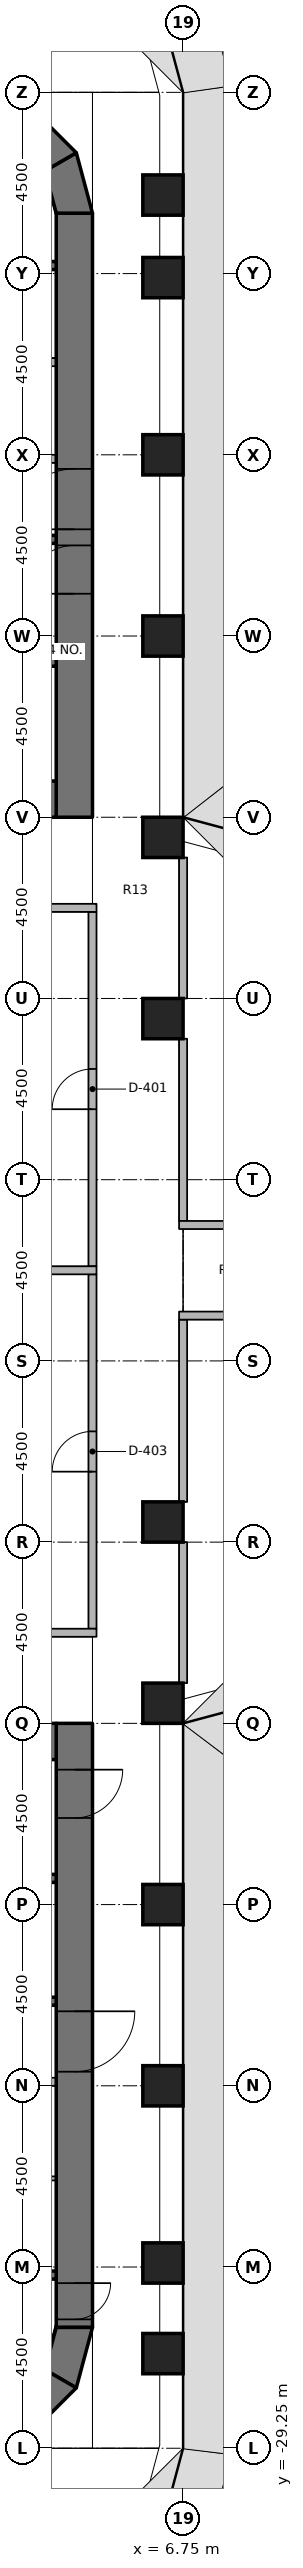
"""IFC4 building model, lengths in metres.
Left out: names, types, materials, properties, quantities, classifications, styles, units other than length and angle.
Written with IfcOpenShell. Run it as: python <this file> out.ifc"""

import sys

from ifc_helpers import new_model, si_unit, direction, frame, frame_2d, origin, origin_2d, place, context, subcontext, project, spatial, polyline, rectangle, outline, extrude, element, fill, save


model = new_model("IFC4")
c1 = context("Model", 3, precision=1e-05, world=origin(), true_north=direction((0.0, 1.0)))
c2 = subcontext(c1, "Body", "Model", "MODEL_VIEW")
j1 = project(units=[si_unit("LENGTHUNIT", "METRE"), si_unit("PLANEANGLEUNIT", "RADIAN")], contexts=[c1])
p1 = place(None, origin())
s1 = spatial("IfcSite", under=j1, at=p1, CompositionType="ELEMENT")
p2 = place(p1, origin())
s2 = spatial("IfcBuilding", under=s1, at=p2, CompositionType="ELEMENT")
p3 = place(p2, frame((0.0, 0.0, 56.4)))
s3 = spatial("IfcBuildingStorey", under=s2, at=p3, CompositionType="ELEMENT", Elevation=56.4)
for number, where, z_axis, x_axis in (
    (1, (6.25, -26.9, 0.0), (0.0, 0.0, 1.0), (1.0, 0.0, 0.0)),
    (2, (6.25, -24.65, 0.0), (0.0, 0.0, 1.0), (1.0, 0.0, 0.0)),
    (3, (6.25, -20.25, 0.0), (0.0, 0.0, 1.0), (1.0, 0.0, 0.0)),
    (4, (6.25, -15.75, 0.0), (0.0, 0.0, 1.0), (1.0, 0.0, 0.0)),
    (5, (6.25, -10.75, 0.0), (0.0, 0.0, 1.0), (1.0, 0.0, 0.0)),
    (6, (6.25, -6.25, 0.0), (0.0, 0.0, 1.0), (1.0, 0.0, 0.0)),
    (7, (6.25, 6.25, 0.0), (0.0, 0.0, 1.0), (1.0, 0.0, 0.0)),
    (8, (6.25, 10.75, 0.0), (0.0, 0.0, 1.0), (1.0, 0.0, 0.0)),
    (9, (6.25, 15.75, 0.0), (0.0, 0.0, 1.0), (1.0, 0.0, 0.0)),
    (10, (6.25, 20.25, 0.0), (0.0, 0.0, 1.0), (1.0, 0.0, 0.0)),
    (11, (6.25, 24.65, 0.0), (0.0, 0.0, 1.0), (1.0, 0.0, 0.0)),
    (12, (6.25, 26.7, 0.0), (0.0, 0.0, 1.0), (1.0, 0.0, 0.0)),
):
    element("IfcColumn", number, at=place(p3, frame(where, z_axis=z_axis, x_axis=x_axis)), inside=s3, PredefinedType="COLUMN", context=c2, shape_type="SweptSolid", body=[
        extrude(rectangle(XDim=1.0, YDim=1.0, at=origin_2d()), origin(), (0.0, 0.0, 1.0), 4.05),
    ])
p4 = place(p3, frame((4.05, 11.25, 0.0), z_axis=(0.0, 0.0, 1.0), x_axis=(0.0, 1.0, 0.0)))
e13 = element("IfcWall", 13, at=p4, inside=s3, PredefinedType="SHEAR", context=c2, shape_type="SweptSolid", body=[
    extrude(rectangle(XDim=15.0, YDim=0.9, at=frame_2d((7.5, 0.0))), origin(), (0.0, 0.0, 1.0), 4.2),
])
p5 = place(p4, frame((7.15, 0.0, 0.0)))
e14 = element("IfcOpeningElement", 14, at=p5, cuts=e13, PredefinedType="OPENING", context=c2, shape_type="SweptSolid", body=[
    extrude(rectangle(XDim=1.5, YDim=2.3, at=frame_2d((0.75, 1.15))), frame((0.0, 0.46, 0.0), z_axis=(0.0, -1.0, 0.0), x_axis=(1.0, 0.0, 0.0)), (0.0, 0.0, 1.0), 0.92),
])
p6 = place(p4, frame((5.55, 0.0, 0.0)))
e15 = element("IfcOpeningElement", 15, at=p6, cuts=e13, PredefinedType="OPENING", context=c2, shape_type="SweptSolid", body=[
    extrude(rectangle(XDim=1.2, YDim=2.1, at=frame_2d((0.6, 1.05))), frame((0.0, 0.46, 0.0), z_axis=(0.0, -1.0, 0.0), x_axis=(1.0, 0.0, 0.0)), (0.0, 0.0, 1.0), 0.92),
])
p7 = place(p3, frame((-3.6, 11.7, 0.0), z_axis=(0.0, 0.0, 1.0), x_axis=(1.0, 0.0, 0.0)))
e16 = element("IfcWall", 16, at=p7, inside=s3, PredefinedType="SHEAR", context=c2, shape_type="SweptSolid", body=[
    extrude(rectangle(XDim=7.2, YDim=0.9, at=frame_2d((3.6, 0.0))), origin(), (0.0, 0.0, 1.0), 4.2),
])
p8 = place(p3, origin())
e17 = element("IfcWall", 17, at=p8, inside=s3, PredefinedType="SHEAR", context=c2, shape_type="SweptSolid", body=[
    extrude(outline(polyline([(4.5, 26.25), (4.098, 27.75), (3.319, 27.3), (3.6, 26.25), (4.5, 26.25)])), origin(), (0.0, 0.0, 1.0), 4.2),
])
p9 = place(p3, origin())
e18 = element("IfcWall", 18, at=p9, inside=s3, PredefinedType="SHEAR", context=c2, shape_type="SweptSolid", body=[
    extrude(outline(polyline([(4.098, 27.75), (3.0, 28.848), (2.55, 28.069), (3.319, 27.3), (4.098, 27.75)])), origin(), (0.0, 0.0, 1.0), 4.2),
])
p10 = place(p3, frame((4.05, -11.25, 0.0), z_axis=(0.0, 0.0, 1.0), x_axis=(0.0, -1.0, 0.0)))
e19 = element("IfcWall", 19, at=p10, inside=s3, PredefinedType="SHEAR", context=c2, shape_type="SweptSolid", body=[
    extrude(rectangle(XDim=15.0, YDim=0.9, at=frame_2d((7.5, 0.0))), origin(), (0.0, 0.0, 1.0), 4.2),
])
p11 = place(p10, frame((7.15, 0.0, 0.0)))
e20 = element("IfcOpeningElement", 20, at=p11, cuts=e19, PredefinedType="OPENING", context=c2, shape_type="SweptSolid", body=[
    extrude(rectangle(XDim=1.5, YDim=2.3, at=frame_2d((0.75, 1.15))), frame((0.0, 0.46, 0.0), z_axis=(0.0, -1.0, 0.0), x_axis=(1.0, 0.0, 0.0)), (0.0, 0.0, 1.0), 0.92),
])
p12 = place(p10, frame((13.9, 0.0, 0.0)))
e21 = element("IfcOpeningElement", 21, at=p12, cuts=e19, PredefinedType="OPENING", context=c2, shape_type="SweptSolid", body=[
    extrude(rectangle(XDim=0.9, YDim=2.1, at=frame_2d((0.45, 1.05))), frame((0.0, 0.46, 0.0), z_axis=(0.0, -1.0, 0.0), x_axis=(1.0, 0.0, 0.0)), (0.0, 0.0, 1.0), 0.92),
])
p13 = place(p10, frame((1.15, 0.0, 0.0)))
e22 = element("IfcOpeningElement", 22, at=p13, cuts=e19, PredefinedType="OPENING", context=c2, shape_type="SweptSolid", body=[
    extrude(rectangle(XDim=1.2, YDim=2.1, at=frame_2d((0.6, 1.05))), frame((0.0, 0.46, 0.0), z_axis=(0.0, -1.0, 0.0), x_axis=(1.0, 0.0, 0.0)), (0.0, 0.0, 1.0), 0.92),
])
p14 = place(p3, frame((-3.6, -11.7, 0.0), z_axis=(0.0, 0.0, 1.0), x_axis=(1.0, 0.0, 0.0)))
e23 = element("IfcWall", 23, at=p14, inside=s3, PredefinedType="SHEAR", context=c2, shape_type="SweptSolid", body=[
    extrude(rectangle(XDim=7.2, YDim=0.9, at=frame_2d((3.6, 0.0))), origin(), (0.0, 0.0, 1.0), 4.2),
])
p15 = place(p3, origin())
e24 = element("IfcWall", 24, at=p15, inside=s3, PredefinedType="SHEAR", context=c2, shape_type="SweptSolid", body=[
    extrude(outline(polyline([(4.5, -26.25), (4.098, -27.75), (3.319, -27.3), (3.6, -26.25), (4.5, -26.25)])), origin(), (0.0, 0.0, 1.0), 4.2),
])
p16 = place(p3, origin())
e25 = element("IfcWall", 25, at=p16, inside=s3, PredefinedType="SHEAR", context=c2, shape_type="SweptSolid", body=[
    extrude(outline(polyline([(4.098, -27.75), (3.0, -28.848), (2.55, -28.069), (3.319, -27.3), (4.098, -27.75)])), origin(), (0.0, 0.0, 1.0), 4.2),
])
for number, where, z_axis, x_axis in (
    (26, (-3.6, 24.95, 0.0), (0.0, 0.0, 1.0), (1.0, 0.0, 0.0)),
    (27, (-3.6, 18.15, 0.0), (0.0, 0.0, 1.0), (1.0, 0.0, 0.0)),
    (28, (-3.6, 15.1, 0.0), (0.0, 0.0, 1.0), (1.0, 0.0, 0.0)),
):
    element("IfcWall", number, at=place(p3, frame(where, z_axis=z_axis, x_axis=x_axis)), inside=s3, PredefinedType="SHEAR", context=c2, shape_type="SweptSolid", body=[
        extrude(rectangle(XDim=7.2, YDim=0.2, at=frame_2d((3.6, 0.0))), origin(), (0.0, 0.0, 1.0), 4.05),
    ])
p17 = place(p3, frame((0.9, 20.15, 0.0), z_axis=(0.0, 0.0, 1.0), x_axis=(1.0, 0.0, 0.0)))
e29 = element("IfcWall", 29, at=p17, inside=s3, PredefinedType="PARTITIONING", context=c2, shape_type="SweptSolid", body=[
    extrude(rectangle(XDim=2.7, YDim=0.2, at=frame_2d((1.35, 0.0))), origin(), (0.0, 0.0, 1.0), 4.05),
])
p18 = place(p3, frame((1.1, 22.55, 0.0), z_axis=(0.0, 0.0, 1.0), x_axis=(1.0, 0.0, 0.0)))
e30 = element("IfcWall", 30, at=p18, inside=s3, PredefinedType="PARTITIONING", context=c2, shape_type="SweptSolid", body=[
    extrude(rectangle(XDim=2.5, YDim=0.2, at=frame_2d((1.25, 0.0))), origin(), (0.0, 0.0, 1.0), 4.05),
])
for number, where, z_axis, x_axis in (
    (31, (3.6, -24.95, 0.0), (0.0, 0.0, 1.0), (-1.0, 0.0, 0.0)),
    (32, (3.6, -18.15, 0.0), (0.0, 0.0, 1.0), (-1.0, 0.0, 0.0)),
    (33, (3.6, -15.1, 0.0), (0.0, 0.0, 1.0), (-1.0, 0.0, 0.0)),
):
    element("IfcWall", number, at=place(p3, frame(where, z_axis=z_axis, x_axis=x_axis)), inside=s3, PredefinedType="SHEAR", context=c2, shape_type="SweptSolid", body=[
        extrude(rectangle(XDim=7.2, YDim=0.2, at=frame_2d((3.6, 0.0))), origin(), (0.0, 0.0, 1.0), 4.05),
    ])
p19 = place(p3, frame((3.6, -20.15, 0.0), z_axis=(0.0, 0.0, 1.0), x_axis=(-1.0, 0.0, 0.0)))
e34 = element("IfcWall", 34, at=p19, inside=s3, PredefinedType="PARTITIONING", context=c2, shape_type="SweptSolid", body=[
    extrude(rectangle(XDim=2.7, YDim=0.2, at=frame_2d((1.35, 0.0))), origin(), (0.0, 0.0, 1.0), 4.05),
])
p20 = place(p3, frame((3.6, -22.55, 0.0), z_axis=(0.0, 0.0, 1.0), x_axis=(-1.0, 0.0, 0.0)))
e35 = element("IfcWall", 35, at=p20, inside=s3, PredefinedType="PARTITIONING", context=c2, shape_type="SweptSolid", body=[
    extrude(rectangle(XDim=2.5, YDim=0.1, at=frame_2d((1.25, 0.0))), origin(), (0.0, 0.0, 1.0), 4.05),
])
p21 = place(p3, frame((4.5, 0.1, 0.0), z_axis=(0.0, 0.0, 1.0), x_axis=(0.0, 1.0, 0.0)))
e36 = element("IfcWall", 36, at=p21, inside=s3, PredefinedType="PARTITIONING", context=c2, shape_type="SweptSolid", body=[
    extrude(rectangle(XDim=8.8, YDim=0.2, at=frame_2d((4.4, 0.0))), origin(), (0.0, 0.0, 1.0), 3.131),
])
p22 = place(p21, frame((3.9, 0.0, 0.0)))
e37 = element("IfcOpeningElement", 37, at=p22, cuts=e36, PredefinedType="OPENING", context=c2, shape_type="SweptSolid", body=[
    extrude(rectangle(XDim=1.0, YDim=2.1, at=frame_2d((0.5, 1.05))), frame((0.0, 0.11, 0.0), z_axis=(0.0, -1.0, 0.0), x_axis=(1.0, 0.0, 0.0)), (0.0, 0.0, 1.0), 0.22),
])
p23 = place(p3, frame((4.5, -8.9, 0.0), z_axis=(0.0, 0.0, 1.0), x_axis=(0.0, 1.0, 0.0)))
e38 = element("IfcWall", 38, at=p23, inside=s3, PredefinedType="PARTITIONING", context=c2, shape_type="SweptSolid", body=[
    extrude(rectangle(XDim=8.8, YDim=0.2, at=frame_2d((4.4, 0.0))), origin(), (0.0, 0.0, 1.0), 3.131),
])
p24 = place(p23, frame((3.9, 0.0, 0.0)))
e39 = element("IfcOpeningElement", 39, at=p24, cuts=e38, PredefinedType="OPENING", context=c2, shape_type="SweptSolid", body=[
    extrude(rectangle(XDim=1.0, YDim=2.1, at=frame_2d((0.5, 1.05))), frame((0.0, 0.11, 0.0), z_axis=(0.0, -1.0, 0.0), x_axis=(1.0, 0.0, 0.0)), (0.0, 0.0, 1.0), 0.22),
])
p25 = place(p3, frame((6.75, 1.225, 0.0), z_axis=(0.0, 0.0, 1.0), x_axis=(0.0, 1.0, 0.0)))
e40 = element("IfcWall", 40, at=p25, inside=s3, PredefinedType="PARTITIONING", context=c2, shape_type="SweptSolid", body=[
    extrude(rectangle(XDim=4.525, YDim=0.2, at=frame_2d((2.262, 0.0))), origin(), (0.0, 0.0, 1.0), 3.131),
])
for number, where, z_axis, x_axis in (
    (41, (6.75, 6.75, 0.0), (0.0, 0.0, 1.0), (0.0, 1.0, 0.0)),
    (42, (6.75, -10.25, 0.0), (0.0, 0.0, 1.0), (0.0, 1.0, 0.0)),
):
    element("IfcWall", number, at=place(p3, frame(where, z_axis=z_axis, x_axis=x_axis)), inside=s3, PredefinedType="PARTITIONING", context=c2, shape_type="SweptSolid", body=[
        extrude(rectangle(XDim=3.5, YDim=0.2, at=frame_2d((1.75, 0.0))), origin(), (0.0, 0.0, 1.0), 3.131),
    ])
p26 = place(p3, frame((6.75, -5.75, 0.0), z_axis=(0.0, 0.0, 1.0), x_axis=(0.0, 1.0, 0.0)))
e43 = element("IfcWall", 43, at=p26, inside=s3, PredefinedType="PARTITIONING", context=c2, shape_type="SweptSolid", body=[
    extrude(rectangle(XDim=4.525, YDim=0.2, at=frame_2d((2.262, 0.0))), origin(), (0.0, 0.0, 1.0), 3.131),
])
for number, where, z_axis, x_axis in (
    (44, (-0.1, 9.0, 0.0), (0.0, 0.0, 1.0), (1.0, 0.0, 0.0)),
    (45, (-0.1, -9.0, 0.0), (0.0, 0.0, 1.0), (1.0, 0.0, 0.0)),
    (46, (-0.1, 0.0, 0.0), (0.0, 0.0, 1.0), (1.0, 0.0, 0.0)),
):
    element("IfcWall", number, at=place(p3, frame(where, z_axis=z_axis, x_axis=x_axis)), inside=s3, PredefinedType="PARTITIONING", context=c2, shape_type="SweptSolid", body=[
        extrude(rectangle(XDim=4.7, YDim=0.2, at=frame_2d((2.35, 0.0))), origin(), (0.0, 0.0, 1.0), 3.131),
    ])
p27 = place(p3, frame((6.65, 1.125, 0.0), z_axis=(0.0, 0.0, 1.0), x_axis=(1.0, 0.0, 0.0)))
e47 = element("IfcWall", 47, at=p27, inside=s3, PredefinedType="PARTITIONING", context=c2, shape_type="SweptSolid", body=[
    extrude(rectangle(XDim=4.7, YDim=0.2, at=frame_2d((2.35, 0.0))), origin(), (0.0, 0.0, 1.0), 3.131),
])
p28 = place(p27, frame((1.85, 0.0, 0.0)))
e48 = element("IfcOpeningElement", 48, at=p28, cuts=e47, PredefinedType="OPENING", context=c2, shape_type="SweptSolid", body=[
    extrude(rectangle(XDim=1.0, YDim=2.1, at=frame_2d((0.5, 1.05))), frame((0.0, 0.11, 0.0), z_axis=(0.0, -1.0, 0.0), x_axis=(1.0, 0.0, 0.0)), (0.0, 0.0, 1.0), 0.22),
])
p29 = place(p3, frame((11.35, -1.125, 0.0), z_axis=(0.0, 0.0, 1.0), x_axis=(-1.0, 0.0, 0.0)))
e49 = element("IfcWall", 49, at=p29, inside=s3, PredefinedType="PARTITIONING", context=c2, shape_type="SweptSolid", body=[
    extrude(rectangle(XDim=4.7, YDim=0.2, at=frame_2d((2.35, 0.0))), origin(), (0.0, 0.0, 1.0), 3.131),
])
p30 = place(p29, frame((1.85, 0.0, 0.0)))
e50 = element("IfcOpeningElement", 50, at=p30, cuts=e49, PredefinedType="OPENING", context=c2, shape_type="SweptSolid", body=[
    extrude(rectangle(XDim=1.0, YDim=2.1, at=frame_2d((0.5, 1.05))), frame((0.0, 0.11, 0.0), z_axis=(0.0, -1.0, 0.0), x_axis=(1.0, 0.0, 0.0)), (0.0, 0.0, 1.0), 0.22),
])
p31 = place(p5, origin())
e51 = element("IfcDoor", 51, at=p31, inside=s3, OperationType="DOUBLE_DOOR_SINGLE_SWING", PredefinedType="DOOR", context=c2, shape_type="SweptSolid", body=[
    extrude(rectangle(XDim=1.5, YDim=2.3, at=frame_2d((0.75, 1.15))), frame((0.0, 0.025, 0.0), z_axis=(0.0, -1.0, 0.0), x_axis=(1.0, 0.0, 0.0)), (0.0, 0.0, 1.0), 0.05),
])
fill(e14, e51)
p32 = place(p6, origin())
e52 = element("IfcDoor", 52, at=p32, inside=s3, OperationType="SINGLE_SWING_LEFT", PredefinedType="DOOR", context=c2, shape_type="SweptSolid", body=[
    extrude(rectangle(XDim=1.2, YDim=2.1, at=frame_2d((0.6, 1.05))), frame((0.0, 0.025, 0.0), z_axis=(0.0, -1.0, 0.0), x_axis=(1.0, 0.0, 0.0)), (0.0, 0.0, 1.0), 0.05),
])
fill(e15, e52)
p33 = place(p11, origin())
e53 = element("IfcDoor", 53, at=p33, inside=s3, OperationType="DOUBLE_DOOR_SINGLE_SWING", PredefinedType="DOOR", context=c2, shape_type="SweptSolid", body=[
    extrude(rectangle(XDim=1.5, YDim=2.3, at=frame_2d((0.75, 1.15))), frame((0.0, 0.025, 0.0), z_axis=(0.0, -1.0, 0.0), x_axis=(1.0, 0.0, 0.0)), (0.0, 0.0, 1.0), 0.05),
])
fill(e20, e53)
p34 = place(p12, origin())
e54 = element("IfcDoor", 54, at=p34, inside=s3, OperationType="SINGLE_SWING_RIGHT", PredefinedType="DOOR", context=c2, shape_type="SweptSolid", body=[
    extrude(rectangle(XDim=0.9, YDim=2.1, at=frame_2d((0.45, 1.05))), frame((0.0, 0.025, 0.0), z_axis=(0.0, -1.0, 0.0), x_axis=(1.0, 0.0, 0.0)), (0.0, 0.0, 1.0), 0.05),
])
fill(e21, e54)
p35 = place(p13, origin())
e55 = element("IfcDoor", 55, at=p35, inside=s3, OperationType="SINGLE_SWING_LEFT", PredefinedType="DOOR", context=c2, shape_type="SweptSolid", body=[
    extrude(rectangle(XDim=1.2, YDim=2.1, at=frame_2d((0.6, 1.05))), frame((0.0, 0.025, 0.0), z_axis=(0.0, -1.0, 0.0), x_axis=(1.0, 0.0, 0.0)), (0.0, 0.0, 1.0), 0.05),
])
fill(e22, e55)
p36 = place(p22, origin())
e56 = element("IfcDoor", 56, at=p36, inside=s3, OperationType="SINGLE_SWING_RIGHT", PredefinedType="DOOR", context=c2, shape_type="SweptSolid", body=[
    extrude(rectangle(XDim=1.0, YDim=2.1, at=frame_2d((0.5, 1.05))), frame((0.0, 0.025, 0.0), z_axis=(0.0, -1.0, 0.0), x_axis=(1.0, 0.0, 0.0)), (0.0, 0.0, 1.0), 0.05),
])
fill(e37, e56)
p37 = place(p24, origin())
e57 = element("IfcDoor", 57, at=p37, inside=s3, OperationType="SINGLE_SWING_RIGHT", PredefinedType="DOOR", context=c2, shape_type="SweptSolid", body=[
    extrude(rectangle(XDim=1.0, YDim=2.1, at=frame_2d((0.5, 1.05))), frame((0.0, 0.025, 0.0), z_axis=(0.0, -1.0, 0.0), x_axis=(1.0, 0.0, 0.0)), (0.0, 0.0, 1.0), 0.05),
])
fill(e39, e57)
save(model, sys.argv[1])
